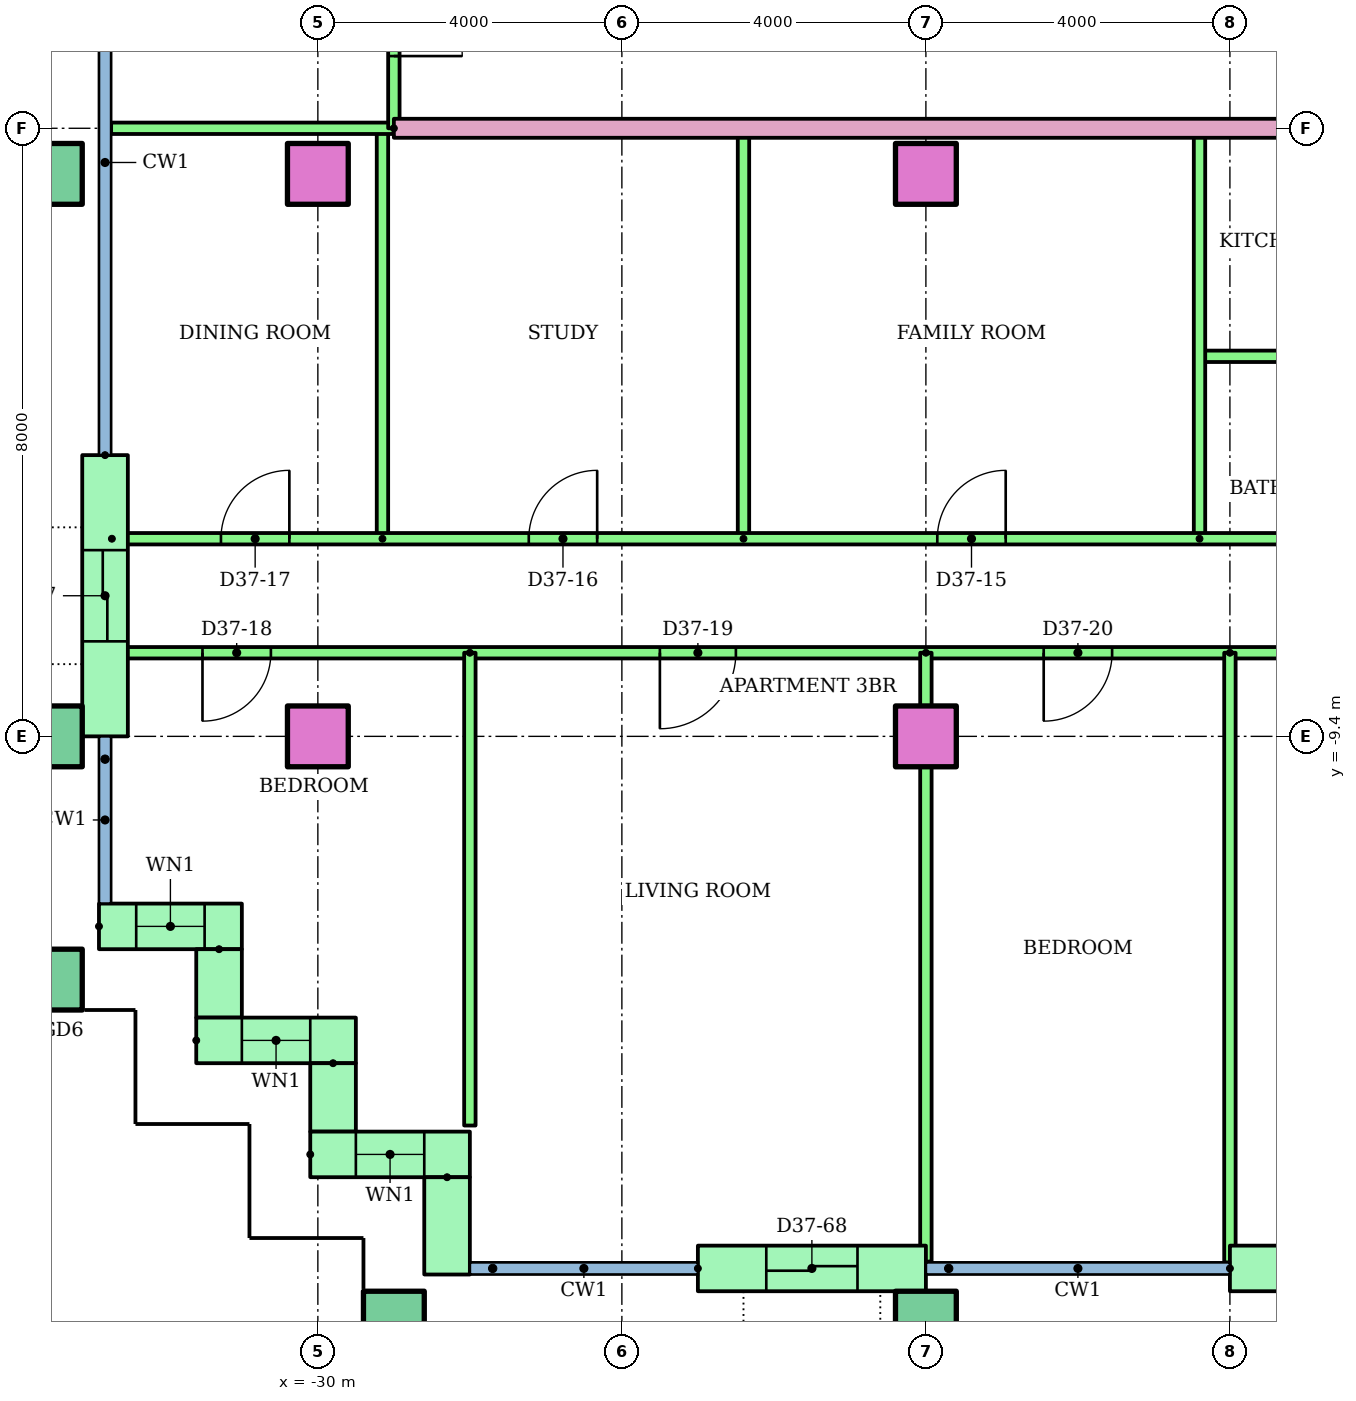
"""IFC4 building model, lengths in metres.
Left out: names, types, materials, properties, quantities, classifications, styles, units other than length and angle.
Written with IfcOpenShell. Run it as: python <this file> out.ifc"""

import sys

from ifc_helpers import new_model, si_unit, direction, frame, frame_2d, origin, origin_2d, place, context, subcontext, project, spatial, rectangle, hollow_rectangle, extrude, element, fill, save


model = new_model("IFC4")
c1 = context("Model", 3, precision=1e-05, world=origin(), true_north=direction((0.0, 1.0)))
c2 = subcontext(c1, "Body", "Model", "MODEL_VIEW")
j1 = project(units=[si_unit("LENGTHUNIT", "METRE"), si_unit("PLANEANGLEUNIT", "RADIAN")], contexts=[c1])
p1 = place(None, origin())
s1 = spatial("IfcSite", under=j1, at=p1, CompositionType="ELEMENT")
p2 = place(p1, origin())
s2 = spatial("IfcBuilding", under=s1, at=p2, CompositionType="ELEMENT")
p3 = place(p2, frame((0.0, 0.0, 142.2)))
s3 = spatial("IfcBuildingStorey", under=s2, at=p3, CompositionType="ELEMENT", Elevation=142.2)
for number, where in (
    (1, (-29.0, -17.1, 0.0)),
    (2, (-22.0, -17.1, 0.0)),
    (3, (-33.5, -12.6, 0.0)),
    (4, (-33.5, -9.4, 0.0)),
):
    element("IfcColumn", number, at=place(p3, frame(where)), inside=s3, PredefinedType="COLUMN", context=c2, shape_type="SweptSolid", body=[
        extrude(hollow_rectangle(XDim=0.8, YDim=0.8, WallThickness=0.04, at=origin_2d()), origin(), (0.0, 0.0, 1.0), 3.2),
    ])
for number, where in (
    (5, (-30.0, -9.4, 0.0)),
    (6, (-22.0, -9.4, 0.0)),
):
    element("IfcColumn", number, at=place(p3, frame(where)), inside=s3, PredefinedType="COLUMN", context=c2, shape_type="SweptSolid", body=[
        extrude(rectangle(XDim=0.8, YDim=0.8, at=origin_2d()), origin(), (0.0, 0.0, 1.0), 3.2),
    ])
p4 = place(p3, frame((-33.5, -2.0, 0.0)))
e7 = element("IfcColumn", 7, at=p4, inside=s3, PredefinedType="COLUMN", context=c2, shape_type="SweptSolid", body=[
    extrude(hollow_rectangle(XDim=0.8, YDim=0.8, WallThickness=0.04, at=origin_2d()), origin(), (0.0, 0.0, 1.0), 3.2),
])
for number, where in (
    (8, (-30.0, -2.0, 0.0)),
    (9, (-22.0, -2.0, 0.0)),
):
    element("IfcColumn", number, at=place(p3, frame(where)), inside=s3, PredefinedType="COLUMN", context=c2, shape_type="SweptSolid", body=[
        extrude(rectangle(XDim=0.8, YDim=0.8, at=origin_2d()), origin(), (0.0, 0.0, 1.0), 3.2),
    ])
p5 = place(p3, frame((-32.8, -5.7, 0.0), z_axis=(0.0, 0.0, 1.0), x_axis=(0.0, -1.0, 0.0)))
e10 = element("IfcWall", 10, at=p5, inside=s3, PredefinedType="STANDARD", context=c2, shape_type="SweptSolid", body=[
    extrude(rectangle(XDim=3.7, YDim=0.6, at=frame_2d((1.85, 0.0))), origin(), (0.0, 0.0, 1.0), 2.92),
])
p6 = place(p5, frame((1.25, 0.0, 0.0)))
e11 = element("IfcOpeningElement", 11, at=p6, cuts=e10, PredefinedType="OPENING", context=c2, shape_type="SweptSolid", body=[
    extrude(rectangle(XDim=1.2, YDim=2.1, at=frame_2d((0.6, 1.05))), frame((0.0, 0.31, 0.0), z_axis=(0.0, -1.0, 0.0), x_axis=(1.0, 0.0, 0.0)), (0.0, 0.0, 1.0), 0.62),
])
p7 = place(p3, frame((-32.88, -11.9, 0.0)))
e12 = element("IfcWall", 12, at=p7, inside=s3, PredefinedType="STANDARD", context=c2, shape_type="SweptSolid", body=[
    extrude(rectangle(XDim=1.88, YDim=0.6, at=frame_2d((0.94, 0.0))), origin(), (0.0, 0.0, 1.0), 2.92),
])
p8 = place(p7, frame((0.49, 0.0, 0.9)))
e13 = element("IfcOpeningElement", 13, at=p8, cuts=e12, PredefinedType="OPENING", context=c2, shape_type="SweptSolid", body=[
    extrude(rectangle(XDim=0.9, YDim=1.5, at=frame_2d((0.45, 0.75))), frame((0.0, 0.31, 0.0), z_axis=(0.0, -1.0, 0.0), x_axis=(1.0, 0.0, 0.0)), (0.0, 0.0, 1.0), 0.62),
])
p9 = place(p3, frame((-31.3, -12.2, 0.0), z_axis=(0.0, 0.0, 1.0), x_axis=(0.0, -1.0, 0.0)))
e14 = element("IfcWall", 14, at=p9, inside=s3, PredefinedType="STANDARD", context=c2, shape_type="SweptSolid", body=[
    extrude(rectangle(XDim=0.9, YDim=0.6, at=frame_2d((0.45, 0.0))), origin(), (0.0, 0.0, 1.0), 2.92),
])
p10 = place(p3, frame((-31.6, -13.4, 0.0)))
e15 = element("IfcWall", 15, at=p10, inside=s3, PredefinedType="STANDARD", context=c2, shape_type="SweptSolid", body=[
    extrude(rectangle(XDim=2.1, YDim=0.6, at=frame_2d((1.05, 0.0))), origin(), (0.0, 0.0, 1.0), 2.92),
])
p11 = place(p10, frame((0.6, 0.0, 0.9)))
e16 = element("IfcOpeningElement", 16, at=p11, cuts=e15, PredefinedType="OPENING", context=c2, shape_type="SweptSolid", body=[
    extrude(rectangle(XDim=0.9, YDim=1.5, at=frame_2d((0.45, 0.75))), frame((0.0, 0.31, 0.0), z_axis=(0.0, -1.0, 0.0), x_axis=(1.0, 0.0, 0.0)), (0.0, 0.0, 1.0), 0.62),
])
p12 = place(p3, frame((-29.8, -13.7, 0.0), z_axis=(0.0, 0.0, 1.0), x_axis=(0.0, -1.0, 0.0)))
e17 = element("IfcWall", 17, at=p12, inside=s3, PredefinedType="STANDARD", context=c2, shape_type="SweptSolid", body=[
    extrude(rectangle(XDim=0.9, YDim=0.6, at=frame_2d((0.45, 0.0))), origin(), (0.0, 0.0, 1.0), 2.92),
])
p13 = place(p3, frame((-30.1, -14.9, 0.0)))
e18 = element("IfcWall", 18, at=p13, inside=s3, PredefinedType="STANDARD", context=c2, shape_type="SweptSolid", body=[
    extrude(rectangle(XDim=2.1, YDim=0.6, at=frame_2d((1.05, 0.0))), origin(), (0.0, 0.0, 1.0), 2.92),
])
p14 = place(p13, frame((0.6, 0.0, 0.9)))
e19 = element("IfcOpeningElement", 19, at=p14, cuts=e18, PredefinedType="OPENING", context=c2, shape_type="SweptSolid", body=[
    extrude(rectangle(XDim=0.9, YDim=1.5, at=frame_2d((0.45, 0.75))), frame((0.0, 0.31, 0.0), z_axis=(0.0, -1.0, 0.0), x_axis=(1.0, 0.0, 0.0)), (0.0, 0.0, 1.0), 0.62),
])
p15 = place(p3, frame((-28.3, -15.2, 0.0), z_axis=(0.0, 0.0, 1.0), x_axis=(0.0, -1.0, 0.0)))
e20 = element("IfcWall", 20, at=p15, inside=s3, PredefinedType="STANDARD", context=c2, shape_type="SweptSolid", body=[
    extrude(rectangle(XDim=1.28, YDim=0.6, at=frame_2d((0.64, 0.0))), origin(), (0.0, 0.0, 1.0), 2.92),
])
p16 = place(p3, frame((-25.0, -16.4, 0.0)))
e21 = element("IfcWall", 21, at=p16, inside=s3, PredefinedType="STANDARD", context=c2, shape_type="SweptSolid", body=[
    extrude(rectangle(XDim=3.0, YDim=0.6, at=frame_2d((1.5, 0.0))), origin(), (0.0, 0.0, 1.0), 2.92),
])
p17 = place(p16, frame((0.9, 0.0, 0.0)))
e22 = element("IfcOpeningElement", 22, at=p17, cuts=e21, PredefinedType="OPENING", context=c2, shape_type="SweptSolid", body=[
    extrude(rectangle(XDim=1.2, YDim=2.1, at=frame_2d((0.6, 1.05))), frame((0.0, 0.31, 0.0), z_axis=(0.0, -1.0, 0.0), x_axis=(1.0, 0.0, 0.0)), (0.0, 0.0, 1.0), 0.62),
])
p18 = place(p3, frame((-18.0, -16.4, 0.0)))
e23 = element("IfcWall", 23, at=p18, inside=s3, PredefinedType="STANDARD", context=c2, shape_type="SweptSolid", body=[
    extrude(rectangle(XDim=4.0, YDim=0.6, at=frame_2d((2.0, 0.0))), origin(), (0.0, 0.0, 1.0), 2.92),
])
p19 = place(p18, frame((1.4, 0.0, 0.0)))
e24 = element("IfcOpeningElement", 24, at=p19, cuts=e23, PredefinedType="OPENING", context=c2, shape_type="SweptSolid", body=[
    extrude(rectangle(XDim=1.2, YDim=2.1, at=frame_2d((0.6, 1.05))), frame((0.0, 0.31, 0.0), z_axis=(0.0, -1.0, 0.0), x_axis=(1.0, 0.0, 0.0)), (0.0, 0.0, 1.0), 0.62),
])
p20 = place(p3, frame((-16.0, -4.4, 0.0), z_axis=(0.0, 0.0, 1.0), x_axis=(-1.0, 0.0, 0.0)))
e25 = element("IfcWall", 25, at=p20, inside=s3, PredefinedType="PARTITIONING", context=c2, shape_type="SweptSolid", body=[
    extrude(rectangle(XDim=2.4, YDim=0.15, at=frame_2d((1.2, 0.0))), origin(), (0.0, 0.0, 1.0), 2.4),
])
for number, where, z_axis, x_axis in (
    (26, (-18.4, -6.8, 0.0), (0.0, 0.0, 1.0), (0.0, 1.0, 0.0)),
    (27, (-24.4, -6.8, 0.0), (0.0, 0.0, 1.0), (0.0, 1.0, 0.0)),
    (28, (-29.15, -6.8, 0.0), (0.0, 0.0, 1.0), (0.0, 1.0, 0.0)),
):
    element("IfcWall", number, at=place(p3, frame(where, z_axis=z_axis, x_axis=x_axis)), inside=s3, PredefinedType="PARTITIONING", context=c2, shape_type="SweptSolid", body=[
        extrude(rectangle(XDim=5.4, YDim=0.15, at=frame_2d((2.7, 0.0))), origin(), (0.0, 0.0, 1.0), 2.4),
    ])
p21 = place(p3, frame((-32.71, -6.8, 0.0)))
e29 = element("IfcWall", 29, at=p21, inside=s3, PredefinedType="PARTITIONING", context=c2, shape_type="SweptSolid", body=[
    extrude(rectangle(XDim=16.71, YDim=0.15, at=frame_2d((8.355, 0.0))), origin(), (0.0, 0.0, 1.0), 2.4),
])
p22 = place(p21, frame((10.86, 0.0, 0.0)))
e30 = element("IfcOpeningElement", 30, at=p22, cuts=e29, PredefinedType="OPENING", context=c2, shape_type="SweptSolid", body=[
    extrude(rectangle(XDim=0.9, YDim=2.1, at=frame_2d((0.45, 1.05))), frame((0.0, 0.085, 0.0), z_axis=(0.0, -1.0, 0.0), x_axis=(1.0, 0.0, 0.0)), (0.0, 0.0, 1.0), 0.17),
])
p23 = place(p21, frame((5.485, 0.0, 0.0)))
e31 = element("IfcOpeningElement", 31, at=p23, cuts=e29, PredefinedType="OPENING", context=c2, shape_type="SweptSolid", body=[
    extrude(rectangle(XDim=0.9, YDim=2.1, at=frame_2d((0.45, 1.05))), frame((0.0, 0.085, 0.0), z_axis=(0.0, -1.0, 0.0), x_axis=(1.0, 0.0, 0.0)), (0.0, 0.0, 1.0), 0.17),
])
p24 = place(p21, frame((1.435, 0.0, 0.0)))
e32 = element("IfcOpeningElement", 32, at=p24, cuts=e29, PredefinedType="OPENING", context=c2, shape_type="SweptSolid", body=[
    extrude(rectangle(XDim=0.9, YDim=2.1, at=frame_2d((0.45, 1.05))), frame((0.0, 0.085, 0.0), z_axis=(0.0, -1.0, 0.0), x_axis=(1.0, 0.0, 0.0)), (0.0, 0.0, 1.0), 0.17),
])
p25 = place(p3, frame((-14.0, -8.3, 0.0), z_axis=(0.0, 0.0, 1.0), x_axis=(-1.0, 0.0, 0.0)))
e33 = element("IfcWall", 33, at=p25, inside=s3, PredefinedType="PARTITIONING", context=c2, shape_type="SweptSolid", body=[
    extrude(rectangle(XDim=18.71, YDim=0.15, at=frame_2d((9.355, 0.0))), origin(), (0.0, 0.0, 1.0), 2.4),
])
p26 = place(p25, frame((16.618, 0.0, 0.0)))
e34 = element("IfcOpeningElement", 34, at=p26, cuts=e33, PredefinedType="OPENING", context=c2, shape_type="SweptSolid", body=[
    extrude(rectangle(XDim=0.9, YDim=2.1, at=frame_2d((0.45, 1.05))), frame((0.0, 0.085, 0.0), z_axis=(0.0, -1.0, 0.0), x_axis=(1.0, 0.0, 0.0)), (0.0, 0.0, 1.0), 0.17),
])
p27 = place(p25, frame((10.5, 0.0, 0.0)))
e35 = element("IfcOpeningElement", 35, at=p27, cuts=e33, PredefinedType="OPENING", context=c2, shape_type="SweptSolid", body=[
    extrude(rectangle(XDim=1.0, YDim=2.1, at=frame_2d((0.5, 1.05))), frame((0.0, 0.085, 0.0), z_axis=(0.0, -1.0, 0.0), x_axis=(1.0, 0.0, 0.0)), (0.0, 0.0, 1.0), 0.17),
])
p28 = place(p25, frame((5.55, 0.0, 0.0)))
e36 = element("IfcOpeningElement", 36, at=p28, cuts=e33, PredefinedType="OPENING", context=c2, shape_type="SweptSolid", body=[
    extrude(rectangle(XDim=0.9, YDim=2.1, at=frame_2d((0.45, 1.05))), frame((0.0, 0.085, 0.0), z_axis=(0.0, -1.0, 0.0), x_axis=(1.0, 0.0, 0.0)), (0.0, 0.0, 1.0), 0.17),
])
p29 = place(p25, frame((1.55, 0.0, 0.0)))
e37 = element("IfcOpeningElement", 37, at=p29, cuts=e33, PredefinedType="OPENING", context=c2, shape_type="SweptSolid", body=[
    extrude(rectangle(XDim=0.9, YDim=2.1, at=frame_2d((0.45, 1.05))), frame((0.0, 0.085, 0.0), z_axis=(0.0, -1.0, 0.0), x_axis=(1.0, 0.0, 0.0)), (0.0, 0.0, 1.0), 0.17),
])
p30 = place(p3, frame((-28.0, -8.3, 0.0), z_axis=(0.0, 0.0, 1.0), x_axis=(0.0, -1.0, 0.0)))
e38 = element("IfcWall", 38, at=p30, inside=s3, PredefinedType="PARTITIONING", context=c2, shape_type="SweptSolid", body=[
    extrude(rectangle(XDim=6.22, YDim=0.15, at=frame_2d((3.11, 0.0))), origin(), (0.0, 0.0, 1.0), 2.4),
])
p31 = place(p3, frame((-22.0, -8.3, 0.0), z_axis=(0.0, 0.0, 1.0), x_axis=(0.0, -1.0, 0.0)))
e39 = element("IfcWall", 39, at=p31, inside=s3, PredefinedType="PARTITIONING", context=c2, shape_type="SweptSolid", body=[
    extrude(rectangle(XDim=8.01, YDim=0.15, at=frame_2d((4.005, 0.0))), origin(), (0.0, 0.0, 1.0), 2.4),
])
p32 = place(p3, frame((-18.0, -8.3, 0.0), z_axis=(0.0, 0.0, 1.0), x_axis=(0.0, -1.0, 0.0)))
e40 = element("IfcWall", 40, at=p32, inside=s3, PredefinedType="PARTITIONING", context=c2, shape_type="SweptSolid", body=[
    extrude(rectangle(XDim=8.021, YDim=0.15, at=frame_2d((4.01, 0.0))), origin(), (0.0, 0.0, 1.0), 2.4),
])
p33 = place(p3, frame((-14.0, -1.4, 0.0), z_axis=(0.0, 0.0, 1.0), x_axis=(-1.0, 0.0, 0.0)))
e41 = element("IfcWall", 41, at=p33, inside=s3, PredefinedType="PARTITIONING", context=c2, shape_type="SweptSolid", body=[
    extrude(rectangle(XDim=15.0, YDim=0.25, at=frame_2d((7.5, 0.0))), origin(), (0.0, 0.0, 1.0), 2.4),
])
p34 = place(p33, frame((0.618, 0.0, 0.0)))
e42 = element("IfcOpeningElement", 42, at=p34, cuts=e41, PredefinedType="OPENING", context=c2, shape_type="SweptSolid", body=[
    extrude(rectangle(XDim=1.0, YDim=2.1, at=frame_2d((0.5, 1.05))), frame((0.0, 0.135, 0.0), z_axis=(0.0, -1.0, 0.0), x_axis=(1.0, 0.0, 0.0)), (0.0, 0.0, 1.0), 0.27),
])
p35 = place(p3, frame((-29.0, -1.4, 0.0), z_axis=(0.0, 0.0, 1.0), x_axis=(-1.0, 0.0, 0.0)))
e43 = element("IfcWall", 43, at=p35, inside=s3, PredefinedType="PARTITIONING", context=c2, shape_type="SweptSolid", body=[
    extrude(rectangle(XDim=3.72, YDim=0.15, at=frame_2d((1.86, 0.0))), origin(), (0.0, 0.0, 1.0), 2.4),
])
p36 = place(p3, frame((-29.0, 1.4, 0.0), z_axis=(0.0, 0.0, 1.0), x_axis=(0.0, -1.0, 0.0)))
e44 = element("IfcWall", 44, at=p36, inside=s3, PredefinedType="PARTITIONING", context=c2, shape_type="SweptSolid", body=[
    extrude(rectangle(XDim=2.8, YDim=0.15, at=frame_2d((1.4, 0.0))), origin(), (0.0, 0.0, 1.0), 2.4),
])
p37 = place(p36, frame((0.95, 0.0, 0.0)))
e45 = element("IfcOpeningElement", 45, at=p37, cuts=e44, PredefinedType="OPENING", context=c2, shape_type="SweptSolid", body=[
    extrude(rectangle(XDim=0.9, YDim=2.1, at=frame_2d((0.45, 1.05))), frame((0.0, 0.085, 0.0), z_axis=(0.0, -1.0, 0.0), x_axis=(1.0, 0.0, 0.0)), (0.0, 0.0, 1.0), 0.17),
])
p38 = place(p8, origin())
e46 = element("IfcWindow", 46, at=p38, inside=s3, PartitioningType="SINGLE_PANEL", PredefinedType="WINDOW", context=c2, shape_type="SweptSolid", body=[
    extrude(rectangle(XDim=0.9, YDim=1.5, at=frame_2d((0.45, 0.75))), frame((0.0, 0.03, 0.0), z_axis=(0.0, -1.0, 0.0), x_axis=(1.0, 0.0, 0.0)), (0.0, 0.0, 1.0), 0.06),
])
fill(e13, e46)
p39 = place(p11, origin())
e47 = element("IfcWindow", 47, at=p39, inside=s3, PartitioningType="SINGLE_PANEL", PredefinedType="WINDOW", context=c2, shape_type="SweptSolid", body=[
    extrude(rectangle(XDim=0.9, YDim=1.5, at=frame_2d((0.45, 0.75))), frame((0.0, 0.03, 0.0), z_axis=(0.0, -1.0, 0.0), x_axis=(1.0, 0.0, 0.0)), (0.0, 0.0, 1.0), 0.06),
])
fill(e16, e47)
p40 = place(p14, origin())
e48 = element("IfcWindow", 48, at=p40, inside=s3, PartitioningType="SINGLE_PANEL", PredefinedType="WINDOW", context=c2, shape_type="SweptSolid", body=[
    extrude(rectangle(XDim=0.9, YDim=1.5, at=frame_2d((0.45, 0.75))), frame((0.0, 0.03, 0.0), z_axis=(0.0, -1.0, 0.0), x_axis=(1.0, 0.0, 0.0)), (0.0, 0.0, 1.0), 0.06),
])
fill(e19, e48)
p41 = place(p22, origin())
e49 = element("IfcDoor", 49, at=p41, inside=s3, OperationType="SINGLE_SWING_RIGHT", PredefinedType="DOOR", context=c2, shape_type="SweptSolid", body=[
    extrude(rectangle(XDim=0.9, YDim=2.1, at=frame_2d((0.45, 1.05))), frame((0.0, 0.025, 0.0), z_axis=(0.0, -1.0, 0.0), x_axis=(1.0, 0.0, 0.0)), (0.0, 0.0, 1.0), 0.05),
])
fill(e30, e49)
p42 = place(p23, origin())
e50 = element("IfcDoor", 50, at=p42, inside=s3, OperationType="SINGLE_SWING_RIGHT", PredefinedType="DOOR", context=c2, shape_type="SweptSolid", body=[
    extrude(rectangle(XDim=0.9, YDim=2.1, at=frame_2d((0.45, 1.05))), frame((0.0, 0.025, 0.0), z_axis=(0.0, -1.0, 0.0), x_axis=(1.0, 0.0, 0.0)), (0.0, 0.0, 1.0), 0.05),
])
fill(e31, e50)
p43 = place(p24, origin())
e51 = element("IfcDoor", 51, at=p43, inside=s3, OperationType="SINGLE_SWING_RIGHT", PredefinedType="DOOR", context=c2, shape_type="SweptSolid", body=[
    extrude(rectangle(XDim=0.9, YDim=2.1, at=frame_2d((0.45, 1.05))), frame((0.0, 0.025, 0.0), z_axis=(0.0, -1.0, 0.0), x_axis=(1.0, 0.0, 0.0)), (0.0, 0.0, 1.0), 0.05),
])
fill(e32, e51)
p44 = place(p26, origin())
e52 = element("IfcDoor", 52, at=p44, inside=s3, OperationType="SINGLE_SWING_RIGHT", PredefinedType="DOOR", context=c2, shape_type="SweptSolid", body=[
    extrude(rectangle(XDim=0.9, YDim=2.1, at=frame_2d((0.45, 1.05))), frame((0.0, 0.025, 0.0), z_axis=(0.0, -1.0, 0.0), x_axis=(1.0, 0.0, 0.0)), (0.0, 0.0, 1.0), 0.05),
])
fill(e34, e52)
p45 = place(p27, origin())
e53 = element("IfcDoor", 53, at=p45, inside=s3, OperationType="SINGLE_SWING_RIGHT", PredefinedType="DOOR", context=c2, shape_type="SweptSolid", body=[
    extrude(rectangle(XDim=1.0, YDim=2.1, at=frame_2d((0.5, 1.05))), frame((0.0, 0.025, 0.0), z_axis=(0.0, -1.0, 0.0), x_axis=(1.0, 0.0, 0.0)), (0.0, 0.0, 1.0), 0.05),
])
fill(e35, e53)
p46 = place(p28, origin())
e54 = element("IfcDoor", 54, at=p46, inside=s3, OperationType="SINGLE_SWING_RIGHT", PredefinedType="DOOR", context=c2, shape_type="SweptSolid", body=[
    extrude(rectangle(XDim=0.9, YDim=2.1, at=frame_2d((0.45, 1.05))), frame((0.0, 0.025, 0.0), z_axis=(0.0, -1.0, 0.0), x_axis=(1.0, 0.0, 0.0)), (0.0, 0.0, 1.0), 0.05),
])
fill(e36, e54)
p47 = place(p37, origin())
e55 = element("IfcDoor", 55, at=p47, inside=s3, OperationType="SINGLE_SWING_RIGHT", PredefinedType="DOOR", context=c2, shape_type="SweptSolid", body=[
    extrude(rectangle(XDim=0.9, YDim=2.1, at=frame_2d((0.45, 1.05))), frame((0.0, 0.025, 0.0), z_axis=(0.0, -1.0, 0.0), x_axis=(1.0, 0.0, 0.0)), (0.0, 0.0, 1.0), 0.05),
])
fill(e45, e55)
p48 = place(p6, origin())
e56 = element("IfcDoor", 56, at=p48, inside=s3, OperationType="SLIDING_TO_LEFT", PredefinedType="DOOR", context=c2, shape_type="SweptSolid", body=[
    extrude(rectangle(XDim=1.2, YDim=2.1, at=frame_2d((0.6, 1.05))), frame((0.0, 0.025, 0.0), z_axis=(0.0, -1.0, 0.0), x_axis=(1.0, 0.0, 0.0)), (0.0, 0.0, 1.0), 0.05),
])
fill(e11, e56)
p49 = place(p17, origin())
e57 = element("IfcDoor", 57, at=p49, inside=s3, OperationType="SLIDING_TO_LEFT", PredefinedType="DOOR", context=c2, shape_type="SweptSolid", body=[
    extrude(rectangle(XDim=1.2, YDim=2.1, at=frame_2d((0.6, 1.05))), frame((0.0, 0.025, 0.0), z_axis=(0.0, -1.0, 0.0), x_axis=(1.0, 0.0, 0.0)), (0.0, 0.0, 1.0), 0.05),
])
fill(e22, e57)
save(model, sys.argv[1])
